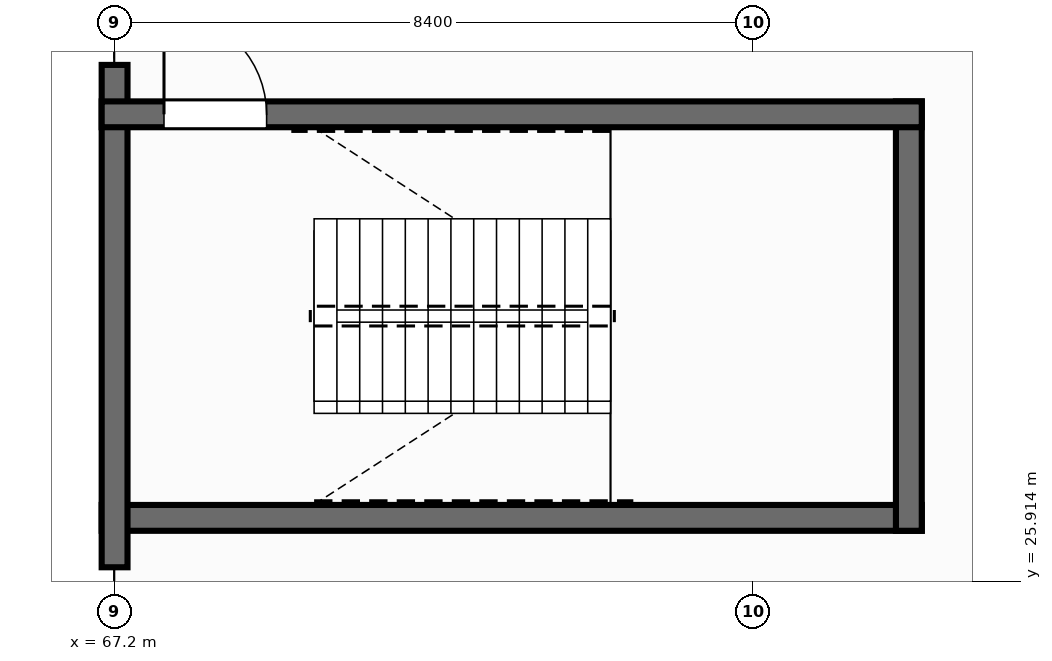
"""IFC4 building model, lengths in metres.
Left out: names, types, materials, properties, quantities, classifications, styles, units other than length and angle.
Written with IfcOpenShell. Run it as: python <this file> out.ifc"""

import sys

from ifc_helpers import new_model, si_unit, direction, frame, frame_2d, origin, place, context, subcontext, project, spatial, rectangle, extrude, element, fill, save


model = new_model("IFC4")
c1 = context("Model", 3, precision=1e-05, world=origin(), true_north=direction((0.0, 1.0)))
c2 = subcontext(c1, "Body", "Model", "MODEL_VIEW")
j1 = project(units=[si_unit("LENGTHUNIT", "METRE"), si_unit("PLANEANGLEUNIT", "RADIAN")], contexts=[c1])
p1 = place(None, origin())
s1 = spatial("IfcSite", under=j1, at=p1, CompositionType="ELEMENT")
p2 = place(p1, origin())
s2 = spatial("IfcBuilding", under=s1, at=p2, CompositionType="ELEMENT")
p3 = place(p2, frame((0.0, 0.0, 5.4)))
s3 = spatial("IfcBuildingStorey", under=s2, at=p3, CompositionType="ELEMENT", Elevation=5.4)
p4 = place(p3, frame((67.035, 26.745, 0.0), z_axis=(0.0, 0.0, 1.0), x_axis=(1.0, 0.0, 0.0)))
e1 = element("IfcWall", 1, at=p4, inside=s3, PredefinedType="SHEAR", context=c2, shape_type="SweptSolid", body=[
    extrude(rectangle(XDim=10.79, YDim=0.34, at=frame_2d((5.395, 0.0))), origin(), (0.0, 0.0, 1.0), 4.29),
])
p5 = place(p3, frame((67.205, 26.095, 0.0), z_axis=(0.0, 0.0, 1.0), x_axis=(0.0, 1.0, 0.0)))
e2 = element("IfcWall", 2, at=p5, inside=s3, PredefinedType="SHEAR", context=c2, shape_type="SweptSolid", body=[
    extrude(rectangle(XDim=6.61, YDim=0.34, at=frame_2d((3.305, 0.0))), origin(), (0.0, 0.0, 1.0), 4.29),
])
p6 = place(p3, frame((77.655, 26.575, 0.0), z_axis=(0.0, 0.0, 1.0), x_axis=(0.0, 1.0, 0.0)))
e3 = element("IfcWall", 3, at=p6, inside=s3, PredefinedType="SHEAR", context=c2, shape_type="SweptSolid", body=[
    extrude(rectangle(XDim=5.65, YDim=0.34, at=frame_2d((2.825, 0.0))), origin(), (0.0, 0.0, 1.0), 4.29),
])
p7 = place(p3, frame((67.035, 32.055, 0.0), z_axis=(0.0, 0.0, 1.0), x_axis=(1.0, 0.0, 0.0)))
e4 = element("IfcWall", 4, at=p7, inside=s3, PredefinedType="SHEAR", context=c2, shape_type="SweptSolid", body=[
    extrude(rectangle(XDim=10.79, YDim=0.34, at=frame_2d((5.395, 0.0))), origin(), (0.0, 0.0, 1.0), 4.29),
])
p8 = place(p7, frame((0.82, 0.0, 0.0)))
e5 = element("IfcOpeningElement", 5, at=p8, cuts=e4, PredefinedType="OPENING", context=c2, shape_type="SweptSolid", body=[
    extrude(rectangle(XDim=1.35, YDim=2.2, at=frame_2d((0.675, 1.1))), frame((0.0, 0.18, 0.0), z_axis=(0.0, -1.0, 0.0), x_axis=(1.0, 0.0, 0.0)), (0.0, 0.0, 1.0), 0.36),
])
p9 = place(p8, origin())
e6 = element("IfcDoor", 6, at=p9, inside=s3, OperationType="SINGLE_SWING_LEFT", PredefinedType="DOOR", context=c2, shape_type="SweptSolid", body=[
    extrude(rectangle(XDim=1.35, YDim=2.2, at=frame_2d((0.675, 1.1))), frame((0.0, 0.025, 0.0), z_axis=(0.0, -1.0, 0.0), x_axis=(1.0, 0.0, 0.0)), (0.0, 0.0, 1.0), 0.05),
])
fill(e5, e6)
save(model, sys.argv[1])
